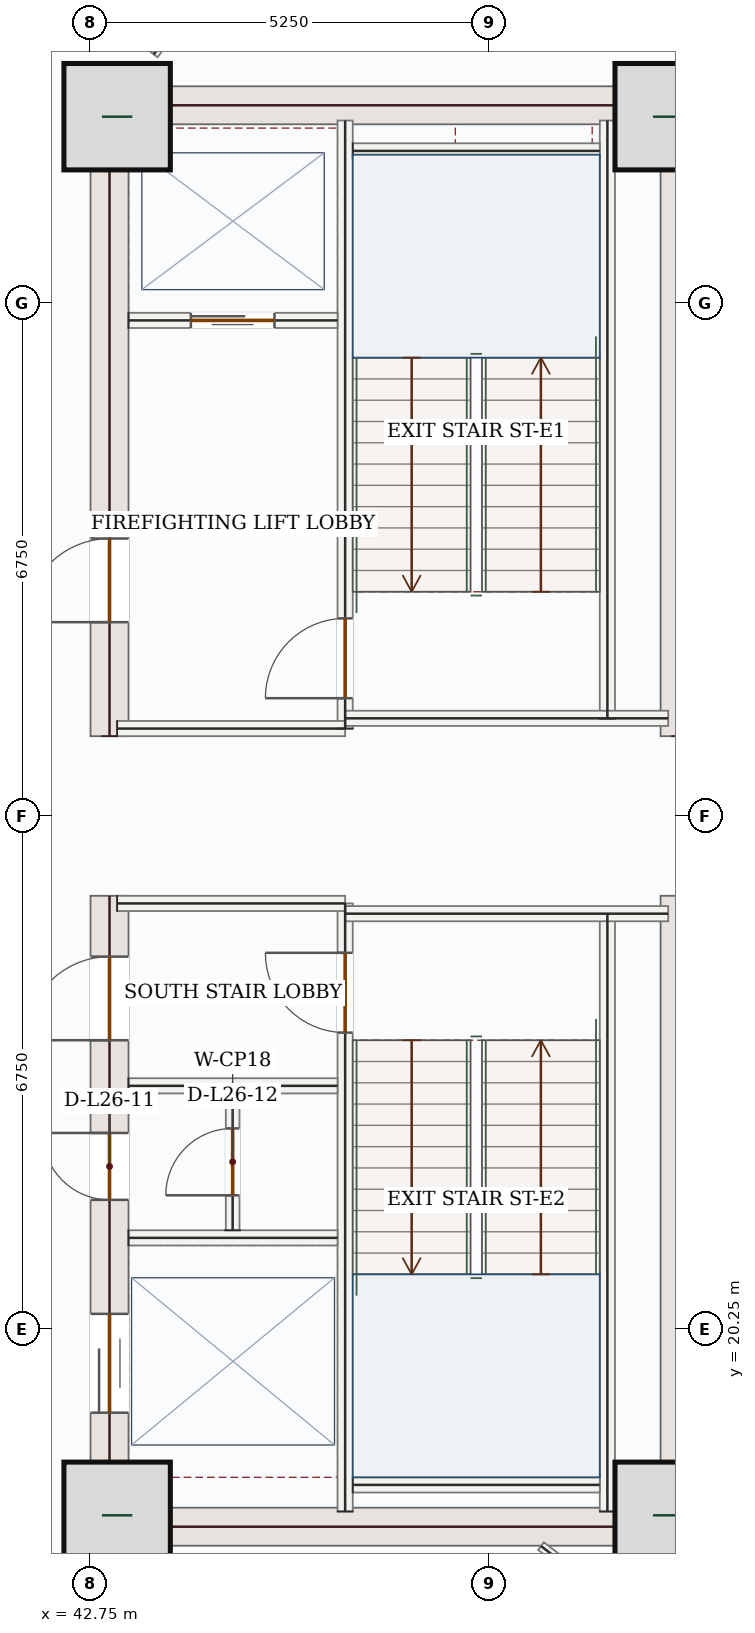
"""IFC4 building model, lengths in metres.
Left out: names, types, materials, properties, quantities, classifications, styles, units other than length and angle.
Written with IfcOpenShell. Run it as: python <this file> out.ifc"""

import sys

from ifc_helpers import new_model, si_unit, direction, frame, frame_2d, origin, origin_2d, place, context, subcontext, project, spatial, rectangle, extrude, source, transform, mapped, element, fill, save


model = new_model("IFC4")
c1 = context("Model", 3, precision=1e-05, world=origin(), true_north=direction((0.0, 1.0)))
c2 = subcontext(c1, "Body", "Model", "MODEL_VIEW")
j1 = project(units=[si_unit("LENGTHUNIT", "METRE"), si_unit("PLANEANGLEUNIT", "RADIAN")], contexts=[c1])
p1 = place(None, origin())
s1 = spatial("IfcSite", under=j1, at=p1, CompositionType="ELEMENT")
p2 = place(p1, origin())
s2 = spatial("IfcBuilding", under=s1, at=p2, CompositionType="ELEMENT")
p3 = place(p2, frame((0.0, 0.0, 117.3)))
s3 = spatial("IfcBuildingStorey", under=s2, at=p3, CompositionType="ELEMENT", Elevation=117.3)
p4 = place(p3, frame((43.0, 17.4, 0.0), z_axis=(0.0, 0.0, 1.0), x_axis=(0.0, 1.0, 0.0)))
e1 = element("IfcWall", 1, at=p4, inside=s3, PredefinedType="SHEAR", context=c2, shape_type="SweptSolid", body=[
    extrude(rectangle(XDim=8.55, YDim=0.5, at=frame_2d((4.275, 0.0))), origin(), (0.0, 0.0, 1.0), 3.95),
])
p5 = place(p4, frame((6.65, 0.0, 0.0)))
e2 = element("IfcOpeningElement", 2, at=p5, cuts=e1, PredefinedType="OPENING", context=c2, shape_type="SweptSolid", body=[
    extrude(rectangle(XDim=1.1, YDim=2.2, at=frame_2d((0.55, 1.1))), frame((0.0, 0.26, 0.0), z_axis=(0.0, -1.0, 0.0), x_axis=(1.0, 0.0, 0.0)), (0.0, 0.0, 1.0), 0.52),
])
p6 = place(p4, frame((1.75, 0.0, 0.0)))
e3 = element("IfcOpeningElement", 3, at=p6, cuts=e1, PredefinedType="OPENING", context=c2, shape_type="SweptSolid", body=[
    extrude(rectangle(XDim=1.3, YDim=2.2, at=frame_2d((0.65, 1.1))), frame((0.0, 0.26, 0.0), z_axis=(0.0, -1.0, 0.0), x_axis=(1.0, 0.0, 0.0)), (0.0, 0.0, 1.0), 0.52),
])
p7 = place(p4, frame((4.55, 0.0, 0.0)))
e4 = element("IfcOpeningElement", 4, at=p7, cuts=e1, PredefinedType="OPENING", context=c2, shape_type="SweptSolid", body=[
    extrude(rectangle(XDim=0.88, YDim=2.1, at=frame_2d((0.44, 1.05))), frame((0.0, 0.26, 0.0), z_axis=(0.0, -1.0, 0.0), x_axis=(1.0, 0.0, 0.0)), (0.0, 0.0, 1.0), 0.52),
])
p8 = place(p3, frame((43.0, 28.05, 0.0), z_axis=(0.0, 0.0, 1.0), x_axis=(0.0, 1.0, 0.0)))
e5 = element("IfcWall", 5, at=p8, inside=s3, PredefinedType="SHEAR", context=c2, shape_type="SweptSolid", body=[
    extrude(rectangle(XDim=8.55, YDim=0.5, at=frame_2d((4.275, 0.0))), origin(), (0.0, 0.0, 1.0), 3.95),
])
p9 = place(p8, frame((1.5, 0.0, 0.0)))
e6 = element("IfcOpeningElement", 6, at=p9, cuts=e5, PredefinedType="OPENING", context=c2, shape_type="SweptSolid", body=[
    extrude(rectangle(XDim=1.1, YDim=2.2, at=frame_2d((0.55, 1.1))), frame((0.0, 0.26, 0.0), z_axis=(0.0, -1.0, 0.0), x_axis=(1.0, 0.0, 0.0)), (0.0, 0.0, 1.0), 0.52),
])
m1 = source(origin(), c2, "Body", "SweptSolid", [
    extrude(rectangle(XDim=8.55, YDim=0.5, at=frame_2d((4.275, 0.0))), origin(), (0.0, 0.0, 1.0), 3.95),
])
for number, where, z_axis, x_axis in (
    (7, (50.5, 17.4, 0.0), (0.0, 0.0, 1.0), (0.0, 1.0, 0.0)),
    (8, (50.5, 28.05, 0.0), (0.0, 0.0, 1.0), (0.0, 1.0, 0.0)),
):
    element("IfcWall", number, at=place(p3, frame(where, z_axis=z_axis, x_axis=x_axis)), inside=s3, PredefinedType="SHEAR", context=c2, shape_type="MappedRepresentation", body=[
        mapped(m1, transform((0.0, 0.0, 0.0), x_axis=(1.0, 0.0, 0.0), y_axis=(0.0, 1.0, 0.0), z_axis=(0.0, 0.0, 1.0), scale=1.0)),
    ])
m2 = source(origin(), c2, "Body", "SweptSolid", [
    extrude(rectangle(XDim=7.0, YDim=0.5, at=frame_2d((3.5, 0.0))), origin(), (0.0, 0.0, 1.0), 3.95),
])
for number, where, z_axis, x_axis in (
    (9, (43.25, 17.65, 0.0), (0.0, 0.0, 1.0), (1.0, 0.0, 0.0)),
    (10, (43.25, 36.35, 0.0), (0.0, 0.0, 1.0), (1.0, 0.0, 0.0)),
):
    element("IfcWall", number, at=place(p3, frame(where, z_axis=z_axis, x_axis=x_axis)), inside=s3, PredefinedType="SHEAR", context=c2, shape_type="MappedRepresentation", body=[
        mapped(m2, transform((0.0, 0.0, 0.0), x_axis=(1.0, 0.0, 0.0), y_axis=(0.0, 1.0, 0.0), z_axis=(0.0, 0.0, 1.0), scale=1.0)),
    ])
m3 = source(origin(), c2, "Body", "SweptSolid", [
    extrude(rectangle(XDim=1.4, YDim=1.4, at=origin_2d()), origin(), (0.0, 0.0, 1.0), 4.2),
])
for number, where, z_axis, x_axis in (
    (11, (43.1, 17.8, 0.0), (0.0, 0.0, 1.0), (1.0, 0.0, 0.0)),
    (12, (50.35, 17.8, 0.0), (0.0, 0.0, 1.0), (1.0, 0.0, 0.0)),
    (13, (43.1, 36.2, 0.0), (0.0, 0.0, 1.0), (1.0, 0.0, 0.0)),
    (14, (50.35, 36.2, 0.0), (0.0, 0.0, 1.0), (1.0, 0.0, 0.0)),
):
    element("IfcColumn", number, at=place(p3, frame(where, z_axis=z_axis, x_axis=x_axis)), inside=s3, PredefinedType="COLUMN", context=c2, shape_type="MappedRepresentation", body=[
        mapped(m3, transform((0.0, 0.0, 0.0), x_axis=(1.0, 0.0, 0.0), y_axis=(0.0, 1.0, 0.0), z_axis=(0.0, 0.0, 1.0), scale=1.0)),
    ])
m4 = source(origin(), c2, "Body", "SweptSolid", [
    extrude(rectangle(XDim=5.258, YDim=0.32, at=frame_2d((2.629, 0.0))), origin(), (0.0, 0.0, 1.0), 3.95),
])
p10 = place(p3, frame((53.06, 18.458, 0.0), z_axis=(0.0, 0.0, 1.0), x_axis=(-0.707106781187, -0.707106781187, 0.0)))
e15 = element("IfcWall", 15, at=p10, inside=s3, PredefinedType="SOLIDWALL", context=c2, shape_type="MappedRepresentation", body=[
    mapped(m4, transform((0.0, 0.0, 0.0), x_axis=(1.0, 0.0, 0.0), y_axis=(0.0, 1.0, 0.0), z_axis=(0.0, 0.0, 1.0), scale=1.0)),
])
m5 = source(origin(), c2, "Body", "SweptSolid", [
    extrude(rectangle(XDim=4.545, YDim=0.32, at=frame_2d((2.272, 0.0))), origin(), (0.0, 0.0, 1.0), 3.95),
])
p11 = place(p3, frame((49.342, 39.26, 0.0), z_axis=(0.0, 0.0, 1.0), x_axis=(0.707106781187, -0.707106781187, 0.0)))
e16 = element("IfcWall", 16, at=p11, inside=s3, PredefinedType="SOLIDWALL", context=c2, shape_type="MappedRepresentation", body=[
    mapped(m5, transform((0.0, 0.0, 0.0), x_axis=(1.0, 0.0, 0.0), y_axis=(0.0, 1.0, 0.0), z_axis=(0.0, 0.0, 1.0), scale=1.0)),
])
m6 = source(origin(), c2, "Body", "SweptSolid", [
    extrude(rectangle(XDim=7.87, YDim=0.2, at=frame_2d((3.935, 0.0))), origin(), (0.0, 0.0, 1.0), 3.95),
])
for number, where, z_axis, x_axis in (
    (17, (49.55, 17.85, 0.0), (0.0, 0.0, 1.0), (0.0, 1.0, 0.0)),
    (18, (49.55, 28.28, 0.0), (0.0, 0.0, 1.0), (0.0, 1.0, 0.0)),
):
    element("IfcWall", number, at=place(p3, frame(where, z_axis=z_axis, x_axis=x_axis)), inside=s3, PredefinedType="SOLIDWALL", context=c2, shape_type="MappedRepresentation", body=[
        mapped(m6, transform((0.0, 0.0, 0.0), x_axis=(1.0, 0.0, 0.0), y_axis=(0.0, 1.0, 0.0), z_axis=(0.0, 0.0, 1.0), scale=1.0)),
    ])
p12 = place(p3, frame((46.1, 17.85, 0.0), z_axis=(0.0, 0.0, 1.0), x_axis=(0.0, 1.0, 0.0)))
e19 = element("IfcWall", 19, at=p12, inside=s3, PredefinedType="SOLIDWALL", context=c2, shape_type="SweptSolid", body=[
    extrude(rectangle(XDim=8.0, YDim=0.2, at=frame_2d((4.0, 0.0))), origin(), (0.0, 0.0, 1.0), 3.95),
])
p13 = place(p12, frame((6.3, 0.0, 0.0)))
e20 = element("IfcOpeningElement", 20, at=p13, cuts=e19, PredefinedType="OPENING", context=c2, shape_type="SweptSolid", body=[
    extrude(rectangle(XDim=1.05, YDim=2.15, at=frame_2d((0.525, 1.075))), frame((0.0, 0.11, 0.0), z_axis=(0.0, -1.0, 0.0), x_axis=(1.0, 0.0, 0.0)), (0.0, 0.0, 1.0), 0.22),
])
p14 = place(p3, frame((46.1, 28.15, 0.0), z_axis=(0.0, 0.0, 1.0), x_axis=(0.0, 1.0, 0.0)))
e21 = element("IfcWall", 21, at=p14, inside=s3, PredefinedType="SOLIDWALL", context=c2, shape_type="SweptSolid", body=[
    extrude(rectangle(XDim=8.0, YDim=0.2, at=frame_2d((4.0, 0.0))), origin(), (0.0, 0.0, 1.0), 3.95),
])
p15 = place(p14, frame((0.4, 0.0, 0.0)))
e22 = element("IfcOpeningElement", 22, at=p15, cuts=e21, PredefinedType="OPENING", context=c2, shape_type="SweptSolid", body=[
    extrude(rectangle(XDim=1.05, YDim=2.15, at=frame_2d((0.525, 1.075))), frame((0.0, 0.11, 0.0), z_axis=(0.0, -1.0, 0.0), x_axis=(1.0, 0.0, 0.0)), (0.0, 0.0, 1.0), 0.22),
])
m7 = source(origin(), c2, "Body", "SweptSolid", [
    extrude(rectangle(XDim=3.0, YDim=0.2, at=frame_2d((1.5, 0.0))), origin(), (0.0, 0.0, 1.0), 3.95),
])
p16 = place(p3, frame((43.1, 25.85, 0.0), z_axis=(0.0, 0.0, 1.0), x_axis=(1.0, 0.0, 0.0)))
e23 = element("IfcWall", 23, at=p16, inside=s3, PredefinedType="SOLIDWALL", context=c2, shape_type="MappedRepresentation", body=[
    mapped(m7, transform((0.0, 0.0, 0.0), x_axis=(1.0, 0.0, 0.0), y_axis=(0.0, 1.0, 0.0), z_axis=(0.0, 0.0, 1.0), scale=1.0)),
])
m8 = source(origin(), c2, "Body", "SweptSolid", [
    extrude(rectangle(XDim=4.25, YDim=0.2, at=frame_2d((2.125, 0.0))), origin(), (0.0, 0.0, 1.0), 3.95),
])
p17 = place(p3, frame((46.1, 25.715, 0.0), z_axis=(0.0, 0.0, 1.0), x_axis=(1.0, 0.0, 0.0)))
e24 = element("IfcWall", 24, at=p17, inside=s3, PredefinedType="SOLIDWALL", context=c2, shape_type="MappedRepresentation", body=[
    mapped(m8, transform((0.0, 0.0, 0.0), x_axis=(1.0, 0.0, 0.0), y_axis=(0.0, 1.0, 0.0), z_axis=(0.0, 0.0, 1.0), scale=1.0)),
])
p18 = place(p3, frame((43.1, 28.15, 0.0), z_axis=(0.0, 0.0, 1.0), x_axis=(1.0, 0.0, 0.0)))
e25 = element("IfcWall", 25, at=p18, inside=s3, PredefinedType="SOLIDWALL", context=c2, shape_type="MappedRepresentation", body=[
    mapped(m7, transform((0.0, 0.0, 0.0), x_axis=(1.0, 0.0, 0.0), y_axis=(0.0, 1.0, 0.0), z_axis=(0.0, 0.0, 1.0), scale=1.0)),
])
p19 = place(p3, frame((46.1, 28.285, 0.0), z_axis=(0.0, 0.0, 1.0), x_axis=(1.0, 0.0, 0.0)))
e26 = element("IfcWall", 26, at=p19, inside=s3, PredefinedType="SOLIDWALL", context=c2, shape_type="MappedRepresentation", body=[
    mapped(m8, transform((0.0, 0.0, 0.0), x_axis=(1.0, 0.0, 0.0), y_axis=(0.0, 1.0, 0.0), z_axis=(0.0, 0.0, 1.0), scale=1.0)),
])
m9 = source(origin(), c2, "Body", "SweptSolid", [
    extrude(rectangle(XDim=3.25, YDim=0.2, at=frame_2d((1.625, 0.0))), origin(), (0.0, 0.0, 1.0), 3.95),
])
for number, where, z_axis, x_axis in (
    (27, (46.2, 35.75, 0.0), (0.0, 0.0, 1.0), (1.0, 0.0, 0.0)),
    (28, (46.2, 18.2, 0.0), (0.0, 0.0, 1.0), (1.0, 0.0, 0.0)),
):
    element("IfcWall", number, at=place(p3, frame(where, z_axis=z_axis, x_axis=x_axis)), inside=s3, PredefinedType="SOLIDWALL", context=c2, shape_type="MappedRepresentation", body=[
        mapped(m9, transform((0.0, 0.0, 0.0), x_axis=(1.0, 0.0, 0.0), y_axis=(0.0, 1.0, 0.0), z_axis=(0.0, 0.0, 1.0), scale=1.0)),
    ])
p20 = place(p3, frame((43.25, 33.52, 0.0), z_axis=(0.0, 0.0, 1.0), x_axis=(1.0, 0.0, 0.0)))
e29 = element("IfcWall", 29, at=p20, inside=s3, PredefinedType="SOLIDWALL", context=c2, shape_type="SweptSolid", body=[
    extrude(rectangle(XDim=2.75, YDim=0.2, at=frame_2d((1.375, 0.0))), origin(), (0.0, 0.0, 1.0), 3.95),
])
p21 = place(p20, frame((0.82, 0.0, 0.0)))
e30 = element("IfcOpeningElement", 30, at=p21, cuts=e29, PredefinedType="OPENING", context=c2, shape_type="SweptSolid", body=[
    extrude(rectangle(XDim=1.1, YDim=2.15, at=frame_2d((0.55, 1.075))), frame((0.0, 0.11, 0.0), z_axis=(0.0, -1.0, 0.0), x_axis=(1.0, 0.0, 0.0)), (0.0, 0.0, 1.0), 0.22),
])
m10 = source(origin(), c2, "Body", "SweptSolid", [
    extrude(rectangle(XDim=2.75, YDim=0.2, at=frame_2d((1.375, 0.0))), origin(), (0.0, 0.0, 1.0), 3.95),
])
for number, where, z_axis, x_axis in (
    (31, (43.25, 23.45, 0.0), (0.0, 0.0, 1.0), (1.0, 0.0, 0.0)),
    (32, (43.25, 21.45, 0.0), (0.0, 0.0, 1.0), (1.0, 0.0, 0.0)),
):
    element("IfcWall", number, at=place(p3, frame(where, z_axis=z_axis, x_axis=x_axis)), inside=s3, PredefinedType="SOLIDWALL", context=c2, shape_type="MappedRepresentation", body=[
        mapped(m10, transform((0.0, 0.0, 0.0), x_axis=(1.0, 0.0, 0.0), y_axis=(0.0, 1.0, 0.0), z_axis=(0.0, 0.0, 1.0), scale=1.0)),
    ])
p22 = place(p3, frame((44.62, 21.55, 0.0), z_axis=(0.0, 0.0, 1.0), x_axis=(0.0, 1.0, 0.0)))
e33 = element("IfcWall", 33, at=p22, inside=s3, PredefinedType="PARTITIONING", context=c2, shape_type="SweptSolid", body=[
    extrude(rectangle(XDim=1.8, YDim=0.18, at=frame_2d((0.9, 0.0))), origin(), (0.0, 0.0, 1.0), 3.95),
])
p23 = place(p22, frame((0.46, 0.0, 0.0)))
e34 = element("IfcOpeningElement", 34, at=p23, cuts=e33, PredefinedType="OPENING", context=c2, shape_type="SweptSolid", body=[
    extrude(rectangle(XDim=0.88, YDim=2.1, at=frame_2d((0.44, 1.05))), frame((0.0, 0.1, 0.0), z_axis=(0.0, -1.0, 0.0), x_axis=(1.0, 0.0, 0.0)), (0.0, 0.0, 1.0), 0.2),
])
m11 = source(origin(), c2, "Body", "SweptSolid", [
    extrude(rectangle(XDim=2.203, YDim=0.125, at=frame_2d((1.102, 0.0))), origin(), (0.0, 0.0, 1.0), 3.95),
])
p24 = place(p3, frame((50.429, 16.061, 0.0), z_axis=(0.0, 0.0, 1.0), x_axis=(-0.795630117323, 0.605782730365, 0.0)))
e35 = element("IfcWall", 35, at=p24, inside=s3, PredefinedType="PARTITIONING", context=c2, shape_type="MappedRepresentation", body=[
    mapped(m11, transform((0.0, 0.0, 0.0), x_axis=(1.0, 0.0, 0.0), y_axis=(0.0, 1.0, 0.0), z_axis=(0.0, 0.0, 1.0), scale=1.0)),
])
m12 = source(origin(), c2, "Body", "SweptSolid", [
    extrude(rectangle(XDim=2.608, YDim=0.125, at=frame_2d((1.304, 0.0))), origin(), (0.0, 0.0, 1.0), 3.95),
])
p25 = place(p3, frame((45.162, 39.095, 0.0), z_axis=(0.0, 0.0, 1.0), x_axis=(-0.605840128894, -0.795586411537, 0.0)))
e36 = element("IfcWall", 36, at=p25, inside=s3, PredefinedType="PARTITIONING", context=c2, shape_type="MappedRepresentation", body=[
    mapped(m12, transform((0.0, 0.0, 0.0), x_axis=(1.0, 0.0, 0.0), y_axis=(0.0, 1.0, 0.0), z_axis=(0.0, 0.0, 1.0), scale=1.0)),
])
m13 = source(origin(), c2, "Body", "SweptSolid", [
    extrude(rectangle(XDim=1.05, YDim=2.15, at=frame_2d((0.525, 1.075))), frame((0.0, 0.025, 0.0), z_axis=(0.0, -1.0, 0.0), x_axis=(1.0, 0.0, 0.0)), (0.0, 0.0, 1.0), 0.05),
])
p26 = place(p15, origin())
e37 = element("IfcDoor", 37, at=p26, inside=s3, OperationType="SINGLE_SWING_LEFT", PredefinedType="DOOR", context=c2, shape_type="MappedRepresentation", body=[
    mapped(m13, transform((0.0, 0.0, 0.0), x_axis=(1.0, 0.0, 0.0), y_axis=(0.0, 1.0, 0.0), z_axis=(0.0, 0.0, 1.0), scale=1.0)),
])
fill(e22, e37)
p27 = place(p13, origin())
e38 = element("IfcDoor", 38, at=p27, inside=s3, OperationType="SINGLE_SWING_RIGHT", PredefinedType="DOOR", context=c2, shape_type="MappedRepresentation", body=[
    mapped(m13, transform((0.0, 0.0, 0.0), x_axis=(1.0, 0.0, 0.0), y_axis=(0.0, 1.0, 0.0), z_axis=(0.0, 0.0, 1.0), scale=1.0)),
])
fill(e20, e38)
m14 = source(origin(), c2, "Body", "SweptSolid", [
    extrude(rectangle(XDim=1.1, YDim=2.15, at=frame_2d((0.55, 1.075))), frame((0.0, 0.025, 0.0), z_axis=(0.0, -1.0, 0.0), x_axis=(1.0, 0.0, 0.0)), (0.0, 0.0, 1.0), 0.05),
])
p28 = place(p21, origin())
e39 = element("IfcDoor", 39, at=p28, inside=s3, OperationType="DOUBLE_DOOR_SLIDING", PredefinedType="DOOR", context=c2, shape_type="MappedRepresentation", body=[
    mapped(m14, transform((0.0, 0.0, 0.0), x_axis=(1.0, 0.0, 0.0), y_axis=(0.0, 1.0, 0.0), z_axis=(0.0, 0.0, 1.0), scale=1.0)),
])
fill(e30, e39)
m15 = source(origin(), c2, "Body", "SweptSolid", [
    extrude(rectangle(XDim=1.1, YDim=2.2, at=frame_2d((0.55, 1.1))), frame((0.0, 0.025, 0.0), z_axis=(0.0, -1.0, 0.0), x_axis=(1.0, 0.0, 0.0)), (0.0, 0.0, 1.0), 0.05),
])
p29 = place(p9, origin())
e40 = element("IfcDoor", 40, at=p29, inside=s3, OperationType="SINGLE_SWING_LEFT", PredefinedType="DOOR", context=c2, shape_type="MappedRepresentation", body=[
    mapped(m15, transform((0.0, 0.0, 0.0), x_axis=(1.0, 0.0, 0.0), y_axis=(0.0, 1.0, 0.0), z_axis=(0.0, 0.0, 1.0), scale=1.0)),
])
fill(e6, e40)
p30 = place(p5, origin())
e41 = element("IfcDoor", 41, at=p30, inside=s3, OperationType="SINGLE_SWING_LEFT", PredefinedType="DOOR", context=c2, shape_type="MappedRepresentation", body=[
    mapped(m15, transform((0.0, 0.0, 0.0), x_axis=(1.0, 0.0, 0.0), y_axis=(0.0, 1.0, 0.0), z_axis=(0.0, 0.0, 1.0), scale=1.0)),
])
fill(e2, e41)
m16 = source(origin(), c2, "Body", "SweptSolid", [
    extrude(rectangle(XDim=1.3, YDim=2.2, at=frame_2d((0.65, 1.1))), frame((0.0, 0.025, 0.0), z_axis=(0.0, -1.0, 0.0), x_axis=(1.0, 0.0, 0.0)), (0.0, 0.0, 1.0), 0.05),
])
p31 = place(p6, origin())
e42 = element("IfcDoor", 42, at=p31, inside=s3, OperationType="DOUBLE_DOOR_SLIDING", PredefinedType="DOOR", context=c2, shape_type="MappedRepresentation", body=[
    mapped(m16, transform((0.0, 0.0, 0.0), x_axis=(1.0, 0.0, 0.0), y_axis=(0.0, 1.0, 0.0), z_axis=(0.0, 0.0, 1.0), scale=1.0)),
])
fill(e3, e42)
m17 = source(origin(), c2, "Body", "SweptSolid", [
    extrude(rectangle(XDim=0.88, YDim=2.1, at=frame_2d((0.44, 1.05))), frame((0.0, 0.025, 0.0), z_axis=(0.0, -1.0, 0.0), x_axis=(1.0, 0.0, 0.0)), (0.0, 0.0, 1.0), 0.05),
])
p32 = place(p7, origin())
e43 = element("IfcDoor", 43, at=p32, inside=s3, OperationType="SINGLE_SWING_RIGHT", PredefinedType="DOOR", context=c2, shape_type="MappedRepresentation", body=[
    mapped(m17, transform((0.0, 0.0, 0.0), x_axis=(1.0, 0.0, 0.0), y_axis=(0.0, 1.0, 0.0), z_axis=(0.0, 0.0, 1.0), scale=1.0)),
])
fill(e4, e43)
p33 = place(p23, origin())
e44 = element("IfcDoor", 44, at=p33, inside=s3, OperationType="SINGLE_SWING_LEFT", PredefinedType="DOOR", context=c2, shape_type="MappedRepresentation", body=[
    mapped(m17, transform((0.0, 0.0, 0.0), x_axis=(1.0, 0.0, 0.0), y_axis=(0.0, 1.0, 0.0), z_axis=(0.0, 0.0, 1.0), scale=1.0)),
])
fill(e34, e44)
save(model, sys.argv[1])
